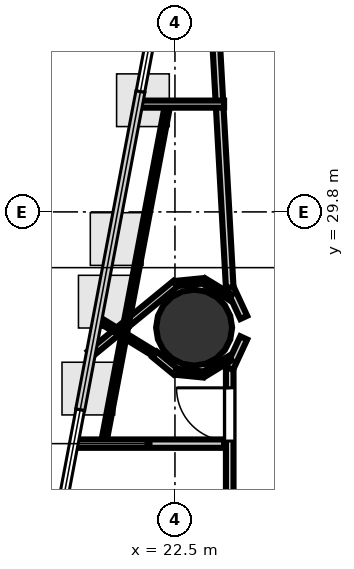
"""IFC4 building model, lengths in metres.
Left out: names, types, materials, properties, quantities, classifications, styles, units other than length and angle.
Written with IfcOpenShell. Run it as: python <this file> out.ifc"""

import sys

from ifc_helpers import new_model, si_unit, direction, frame, frame_2d, origin, origin_2d, place, context, subcontext, project, spatial, rectangle, hollow_circle, extrude, element, fill, save


model = new_model("IFC4")
c1 = context("Model", 3, precision=1e-05, world=origin(), true_north=direction((0.0, 1.0)))
c2 = subcontext(c1, "Body", "Model", "MODEL_VIEW")
j1 = project(units=[si_unit("LENGTHUNIT", "METRE"), si_unit("PLANEANGLEUNIT", "RADIAN")], contexts=[c1])
p1 = place(None, origin())
s1 = spatial("IfcSite", under=j1, at=p1, CompositionType="ELEMENT")
p2 = place(p1, origin())
s2 = spatial("IfcBuilding", under=s1, at=p2, CompositionType="ELEMENT")
p3 = place(p2, frame((0.0, 0.0, 101.5)))
s3 = spatial("IfcBuildingStorey", under=s2, at=p3, CompositionType="ELEMENT", Elevation=101.5)
p4 = place(p3, frame((22.878, 27.516, 0.0), z_axis=(0.0, 0.0, 1.0), x_axis=(1.0, 0.0, 0.0)))
e1 = element("IfcColumn", 1, at=p4, inside=s3, PredefinedType="COLUMN", context=c2, shape_type="SweptSolid", body=[
    extrude(hollow_circle(Radius=0.75, WallThickness=0.036, at=origin_2d()), origin(), (0.0, 0.0, 1.0), 3.7),
])
p5 = place(p3, frame((23.581, 18.15, 0.0), z_axis=(0.0, 0.0, 1.0), x_axis=(0.0, 1.0, 0.0)))
e2 = element("IfcWall", 2, at=p5, inside=s3, PredefinedType="PARTITIONING", context=c2, shape_type="SweptSolid", body=[
    extrude(rectangle(XDim=8.575, YDim=0.15, at=frame_2d((4.288, 0.0))), origin(), (0.0, 0.0, 1.0), 2.84),
])
p6 = place(p5, frame((3.474, 0.0, 0.0)))
e3 = element("IfcOpeningElement", 3, at=p6, cuts=e2, PredefinedType="OPENING", context=c2, shape_type="SweptSolid", body=[
    extrude(rectangle(XDim=0.9, YDim=2.1, at=frame_2d((0.45, 1.05))), frame((0.0, 0.085, 0.0), z_axis=(0.0, -1.0, 0.0), x_axis=(1.0, 0.0, 0.0)), (0.0, 0.0, 1.0), 0.17),
])
p7 = place(p5, frame((7.128, 0.0, 0.0)))
e4 = element("IfcOpeningElement", 4, at=p7, cuts=e2, PredefinedType="OPENING", context=c2, shape_type="SweptSolid", body=[
    extrude(rectangle(XDim=1.05, YDim=2.15, at=frame_2d((0.525, 1.075))), frame((0.0, 0.085, 0.0), z_axis=(0.0, -1.0, 0.0), x_axis=(1.0, 0.0, 0.0)), (0.0, 0.0, 1.0), 0.17),
])
for number, where, z_axis, x_axis in (
    (5, (23.578, 26.712, 0.0), (0.0, 0.0, 1.0), (0.421, 0.907, 0.0)),
    (6, (23.857, 27.718, 0.0), (0.0, 0.0, 1.0), (-0.421, 0.907, 0.0)),
):
    element("IfcWall", number, at=place(p3, frame(where, z_axis=z_axis, x_axis=x_axis)), inside=s3, PredefinedType="PARTITIONING", context=c2, shape_type="SweptSolid", body=[
        extrude(rectangle(XDim=0.663, YDim=0.15, at=frame_2d((0.332, 0.0))), origin(), (0.0, 0.0, 1.0), 2.84),
    ])
p8 = place(p3, frame((23.581, 28.307, 0.0), z_axis=(0.0, 0.0, 1.0), x_axis=(-0.055409067337, 0.998463737577, 0.0)))
e7 = element("IfcWall", 7, at=p8, inside=s3, PredefinedType="PARTITIONING", context=c2, shape_type="SweptSolid", body=[
    extrude(rectangle(XDim=10.205, YDim=0.15, at=frame_2d((5.102, 0.0))), origin(), (0.0, 0.0, 1.0), 2.84),
])
p9 = place(p3, frame((20.484, 25.227, 0.0), z_axis=(0.0, 0.0, 1.0), x_axis=(1.0, 0.0, 0.0)))
e8 = element("IfcWall", 8, at=p9, inside=s3, PredefinedType="PLUMBINGWALL", context=c2, shape_type="SweptSolid", body=[
    extrude(rectangle(XDim=2.986, YDim=0.165, at=frame_2d((1.493, 0.0))), origin(), (0.0, 0.0, 1.0), 2.84),
])
p10 = place(p3, frame((23.595, 28.116, 0.0), z_axis=(0.0, 0.0, 1.0), x_axis=(-0.853675286084, 0.520805631622, 0.0)))
e9 = element("IfcWall", 9, at=p10, inside=s3, PredefinedType="PARTITIONING", context=c2, shape_type="SweptSolid", body=[
    extrude(rectangle(XDim=0.613, YDim=0.12, at=frame_2d((0.307, 0.0))), origin(), (0.0, 0.0, 1.0), 2.84),
])
p11 = place(p3, frame((23.052, 28.439, 0.0), z_axis=(0.0, 0.0, 1.0), x_axis=(-0.995191506225, -0.09794828195, 0.0)))
e10 = element("IfcWall", 10, at=p11, inside=s3, PredefinedType="PARTITIONING", context=c2, shape_type="SweptSolid", body=[
    extrude(rectangle(XDim=0.528, YDim=0.105, at=frame_2d((0.264, 0.0))), origin(), (0.0, 0.0, 1.0), 2.84),
])
p12 = place(p3, frame((22.51, 28.381, 0.0), z_axis=(0.0, 0.0, 1.0), x_axis=(-0.772957823968, -0.634457407843, 0.0)))
e11 = element("IfcWall", 11, at=p12, inside=s3, PredefinedType="PARTITIONING", context=c2, shape_type="SweptSolid", body=[
    extrude(rectangle(XDim=2.179, YDim=0.14, at=frame_2d((1.089, 0.0))), origin(), (0.0, 0.0, 1.0), 2.84),
])
p13 = place(p3, frame((20.97, 27.69, 0.0), z_axis=(0.0, 0.0, 1.0), x_axis=(0.852211848036, -0.523196871232, 0.0)))
e12 = element("IfcWall", 12, at=p13, inside=s3, PredefinedType="PARTITIONING", context=c2, shape_type="SweptSolid", body=[
    extrude(rectangle(XDim=1.316, YDim=0.105, at=frame_2d((0.658, 0.0))), origin(), (0.0, 0.0, 1.0), 2.84),
])
p14 = place(p3, frame((22.102, 26.987, 0.0), z_axis=(0.0, 0.0, 1.0), x_axis=(0.772823405661, -0.634621133955, 0.0)))
e13 = element("IfcWall", 13, at=p14, inside=s3, PredefinedType="PARTITIONING", context=c2, shape_type="SweptSolid", body=[
    extrude(rectangle(XDim=0.528, YDim=0.14, at=frame_2d((0.264, 0.0))), origin(), (0.0, 0.0, 1.0), 2.84),
])
p15 = place(p3, frame((22.527, 26.644, 0.0), z_axis=(0.0, 0.0, 1.0), x_axis=(0.995191506225, -0.09794828195, 0.0)))
e14 = element("IfcWall", 14, at=p15, inside=s3, PredefinedType="PARTITIONING", context=c2, shape_type="SweptSolid", body=[
    extrude(rectangle(XDim=0.528, YDim=0.12, at=frame_2d((0.264, 0.0))), origin(), (0.0, 0.0, 1.0), 2.84),
])
p16 = place(p3, frame((23.072, 26.597, 0.0), z_axis=(0.0, 0.0, 1.0), x_axis=(0.853675286084, 0.520805631622, 0.0)))
e15 = element("IfcWall", 15, at=p16, inside=s3, PredefinedType="PARTITIONING", context=c2, shape_type="SweptSolid", body=[
    extrude(rectangle(XDim=0.613, YDim=0.105, at=frame_2d((0.307, 0.0))), origin(), (0.0, 0.0, 1.0), 2.84),
])
p17 = place(p3, frame((21.111, 25.336, 0.0), z_axis=(0.0, 0.0, 1.0), x_axis=(0.186002357958, 0.982549297915, 0.0)))
e16 = element("IfcWall", 16, at=p17, inside=s3, PredefinedType="PARTITIONING", context=c2, shape_type="SweptSolid", body=[
    extrude(rectangle(XDim=6.733, YDim=0.105, at=frame_2d((3.367, 0.0))), origin(), (0.0, 0.0, 1.0), 2.84),
])
p18 = place(p3, frame((21.752, 31.927, 0.0), z_axis=(0.0, 0.0, 1.0), x_axis=(1.0, 0.0, 0.0)))
e17 = element("IfcWall", 17, at=p18, inside=s3, PredefinedType="PARTITIONING", context=c2, shape_type="SweptSolid", body=[
    extrude(rectangle(XDim=1.718, YDim=0.14, at=frame_2d((0.859, 0.0))), origin(), (0.0, 0.0, 1.0), 2.84),
])
p19 = place(p7, origin())
e18 = element("IfcDoor", 18, at=p19, inside=s3, OperationType="SINGLE_SWING_RIGHT", PredefinedType="DOOR", context=c2, shape_type="SweptSolid", body=[
    extrude(rectangle(XDim=1.05, YDim=2.15, at=frame_2d((0.525, 1.075))), frame((0.0, 0.025, 0.0), z_axis=(0.0, -1.0, 0.0), x_axis=(1.0, 0.0, 0.0)), (0.0, 0.0, 1.0), 0.05),
])
fill(e4, e18)
save(model, sys.argv[1])
